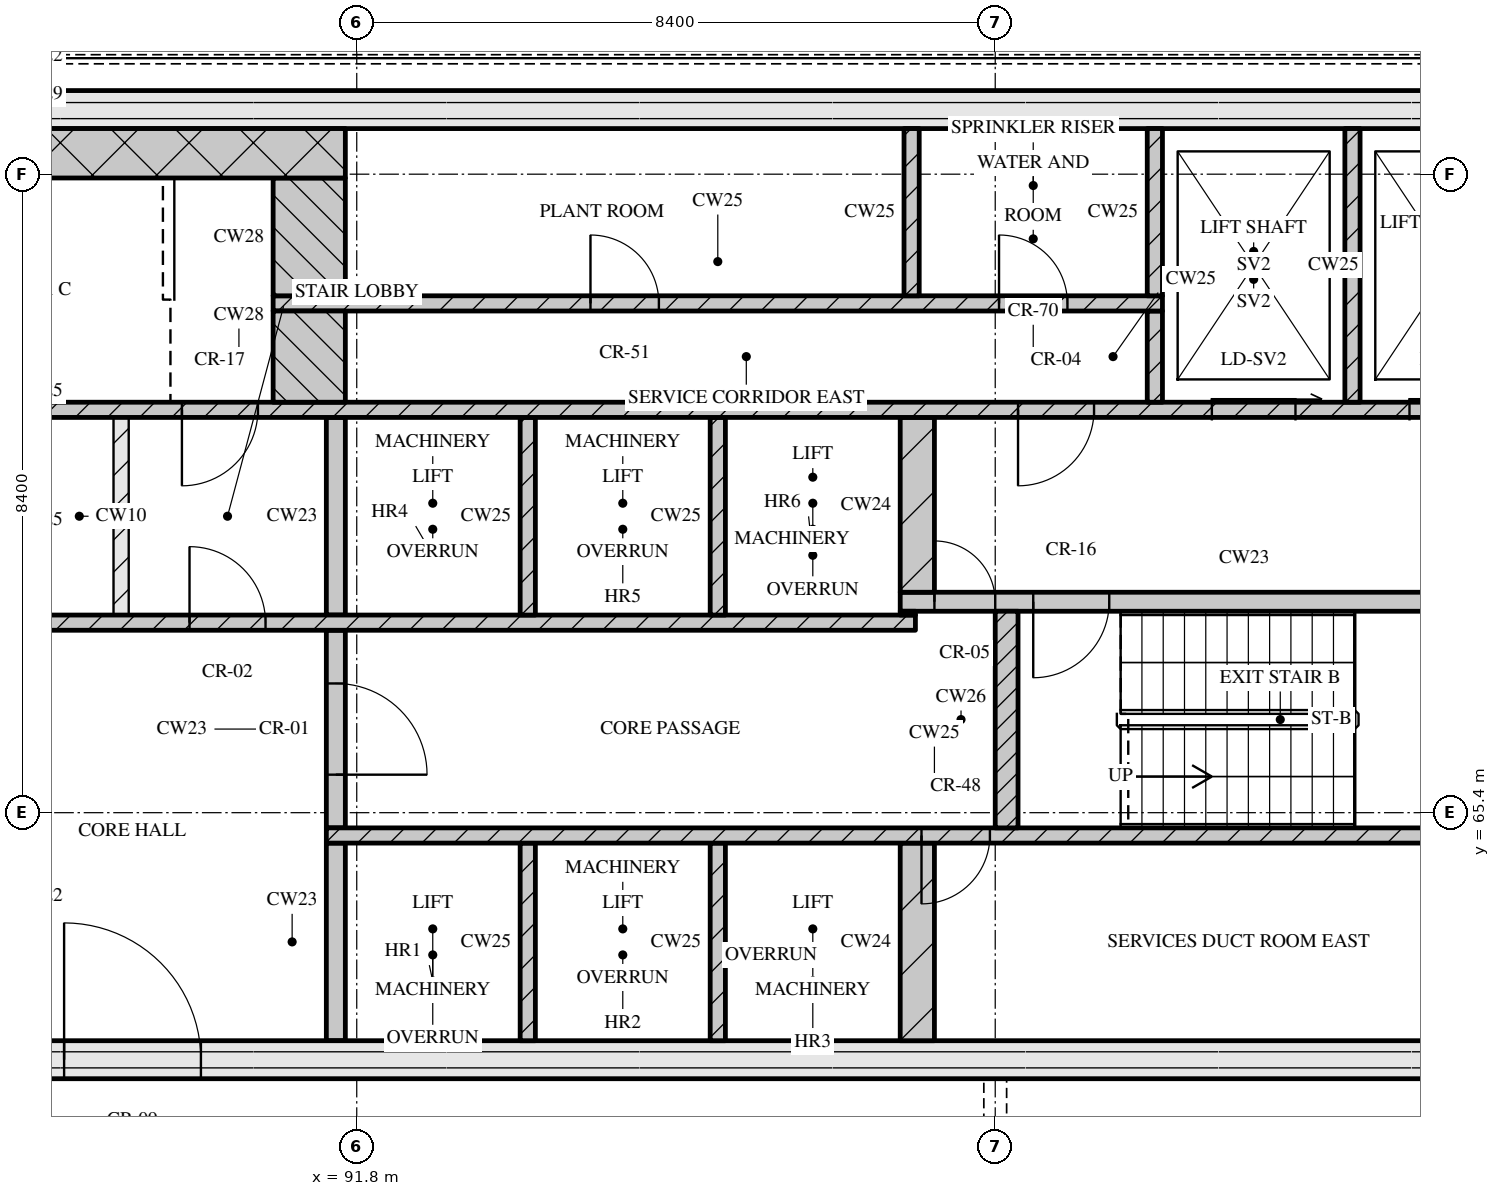
"""IFC4 building model, lengths in metres.
Left out: names, types, materials, properties, quantities, classifications, styles, units other than length and angle.
Written with IfcOpenShell. Run it as: python <this file> out.ifc"""

import sys

from ifc_helpers import new_model, si_unit, direction, frame, frame_2d, origin, place, context, subcontext, project, spatial, rectangle, extrude, element, fill, save


model = new_model("IFC4")
c1 = context("Model", 3, precision=1e-05, world=origin(), true_north=direction((0.0, 1.0)))
c2 = subcontext(c1, "Body", "Model", "MODEL_VIEW")
j1 = project(units=[si_unit("LENGTHUNIT", "METRE"), si_unit("PLANEANGLEUNIT", "RADIAN")], contexts=[c1])
p1 = place(None, origin())
s1 = spatial("IfcSite", under=j1, at=p1, CompositionType="ELEMENT")
p2 = place(p1, origin())
s2 = spatial("IfcBuilding", under=s1, at=p2, CompositionType="ELEMENT")
p3 = place(p2, frame((0.0, 0.0, 310.35)))
s3 = spatial("IfcBuildingStorey", under=s2, at=p3, CompositionType="ELEMENT", Elevation=310.35)
p4 = place(p3, frame((67.3, 62.15, 0.0), z_axis=(0.0, 0.0, 1.0), x_axis=(1.0, 0.0, 0.0)))
e1 = element("IfcWall", 1, at=p4, inside=s3, PredefinedType="SOLIDWALL", context=c2, shape_type="SweptSolid", body=[
    extrude(rectangle(XDim=40.6, YDim=0.5, at=frame_2d((20.3, 0.0))), origin(), (0.0, 0.0, 1.0), 4.2),
])
p5 = place(p4, frame((20.65, 0.0, 0.0)))
e2 = element("IfcOpeningElement", 2, at=p5, cuts=e1, PredefinedType="OPENING", context=c2, shape_type="SweptSolid", body=[
    extrude(rectangle(XDim=1.8, YDim=2.1, at=frame_2d((0.9, 1.05))), frame((0.0, 0.26, 0.0), z_axis=(0.0, -1.0, 0.0), x_axis=(1.0, 0.0, 0.0)), (0.0, 0.0, 1.0), 0.52),
])
p6 = place(p3, frame((67.3, 74.65, 0.0), z_axis=(0.0, 0.0, 1.0), x_axis=(1.0, 0.0, 0.0)))
e3 = element("IfcWall", 3, at=p6, inside=s3, PredefinedType="SOLIDWALL", context=c2, shape_type="SweptSolid", body=[
    extrude(rectangle(XDim=40.6, YDim=0.5, at=frame_2d((20.3, 0.0))), origin(), (0.0, 0.0, 1.0), 4.2),
])
p7 = place(p3, frame((91.525, 62.4, 0.0), z_axis=(0.0, 0.0, 1.0), x_axis=(0.0, 1.0, 0.0)))
e4 = element("IfcWall", 4, at=p7, inside=s3, PredefinedType="SOLIDWALL", context=c2, shape_type="SweptSolid", body=[
    extrude(rectangle(XDim=2.6, YDim=0.25, at=frame_2d((1.3, 0.0))), origin(), (0.0, 0.0, 1.0), 4.2),
])
for number, where, z_axis, x_axis in (
    (5, (94.05, 62.4, 0.0), (0.0, 0.0, 1.0), (0.0, 1.0, 0.0)),
    (6, (96.55, 62.4, 0.0), (0.0, 0.0, 1.0), (0.0, 1.0, 0.0)),
):
    element("IfcWall", number, at=place(p3, frame(where, z_axis=z_axis, x_axis=x_axis)), inside=s3, PredefinedType="SOLIDWALL", context=c2, shape_type="SweptSolid", body=[
        extrude(rectangle(XDim=2.6, YDim=0.2, at=frame_2d((1.3, 0.0))), origin(), (0.0, 0.0, 1.0), 4.2),
    ])
p8 = place(p3, frame((99.175, 62.4, 0.0), z_axis=(0.0, 0.0, 1.0), x_axis=(0.0, 1.0, 0.0)))
e7 = element("IfcWall", 7, at=p8, inside=s3, PredefinedType="SOLIDWALL", context=c2, shape_type="SweptSolid", body=[
    extrude(rectangle(XDim=2.6, YDim=0.45, at=frame_2d((1.3, 0.0))), origin(), (0.0, 0.0, 1.0), 4.2),
])
p9 = place(p3, frame((91.4, 65.1, 0.0), z_axis=(0.0, 0.0, 1.0), x_axis=(1.0, 0.0, 0.0)))
e8 = element("IfcWall", 8, at=p9, inside=s3, PredefinedType="SOLIDWALL", context=c2, shape_type="SweptSolid", body=[
    extrude(rectangle(XDim=16.0, YDim=0.2, at=frame_2d((8.0, 0.0))), origin(), (0.0, 0.0, 1.0), 4.2),
])
p10 = place(p9, frame((7.83, 0.0, 0.0)))
e9 = element("IfcOpeningElement", 9, at=p10, cuts=e8, PredefinedType="OPENING", context=c2, shape_type="SweptSolid", body=[
    extrude(rectangle(XDim=0.9, YDim=2.1, at=frame_2d((0.45, 1.05))), frame((0.0, 0.11, 0.0), z_axis=(0.0, -1.0, 0.0), x_axis=(1.0, 0.0, 0.0)), (0.0, 0.0, 1.0), 0.22),
])
p11 = place(p3, frame((91.525, 65.2, 0.0), z_axis=(0.0, 0.0, 1.0), x_axis=(0.0, 1.0, 0.0)))
e10 = element("IfcWall", 10, at=p11, inside=s3, PredefinedType="SOLIDWALL", context=c2, shape_type="SweptSolid", body=[
    extrude(rectangle(XDim=2.6, YDim=0.25, at=frame_2d((1.3, 0.0))), origin(), (0.0, 0.0, 1.0), 4.2),
])
p12 = place(p11, frame((0.7, 0.0, 0.0)))
e11 = element("IfcOpeningElement", 11, at=p12, cuts=e10, PredefinedType="OPENING", context=c2, shape_type="SweptSolid", body=[
    extrude(rectangle(XDim=1.2, YDim=2.1, at=frame_2d((0.6, 1.05))), frame((0.0, 0.135, 0.0), z_axis=(0.0, -1.0, 0.0), x_axis=(1.0, 0.0, 0.0)), (0.0, 0.0, 1.0), 0.27),
])
p13 = place(p3, frame((100.35, 65.2, 0.0), z_axis=(0.0, 0.0, 1.0), x_axis=(0.0, 1.0, 0.0)))
e12 = element("IfcWall", 12, at=p13, inside=s3, PredefinedType="SOLIDWALL", context=c2, shape_type="SweptSolid", body=[
    extrude(rectangle(XDim=2.85, YDim=0.3, at=frame_2d((1.425, 0.0))), origin(), (0.0, 0.0, 1.0), 4.2),
])
p14 = place(p3, frame((76.05, 67.9, 0.0), z_axis=(0.0, 0.0, 1.0), x_axis=(1.0, 0.0, 0.0)))
e13 = element("IfcWall", 13, at=p14, inside=s3, PredefinedType="SOLIDWALL", context=c2, shape_type="SweptSolid", body=[
    extrude(rectangle(XDim=23.1, YDim=0.2, at=frame_2d((11.55, 0.0))), origin(), (0.0, 0.0, 1.0), 4.2),
])
p15 = place(p14, frame((1.95, 0.0, 0.0)))
e14 = element("IfcOpeningElement", 14, at=p15, cuts=e13, PredefinedType="OPENING", context=c2, shape_type="SweptSolid", body=[
    extrude(rectangle(XDim=0.9, YDim=2.1, at=frame_2d((0.45, 1.05))), frame((0.0, 0.11, 0.0), z_axis=(0.0, -1.0, 0.0), x_axis=(1.0, 0.0, 0.0)), (0.0, 0.0, 1.0), 0.22),
])
p16 = place(p14, frame((5.66, 0.0, 0.0)))
e15 = element("IfcOpeningElement", 15, at=p16, cuts=e13, PredefinedType="OPENING", context=c2, shape_type="SweptSolid", body=[
    extrude(rectangle(XDim=0.9, YDim=2.1, at=frame_2d((0.45, 1.05))), frame((0.0, 0.11, 0.0), z_axis=(0.0, -1.0, 0.0), x_axis=(1.0, 0.0, 0.0)), (0.0, 0.0, 1.0), 0.22),
])
p17 = place(p14, frame((9.7, 0.0, 0.0)))
e16 = element("IfcOpeningElement", 16, at=p17, cuts=e13, PredefinedType="OPENING", context=c2, shape_type="SweptSolid", body=[
    extrude(rectangle(XDim=0.9, YDim=2.1, at=frame_2d((0.45, 1.05))), frame((0.0, 0.11, 0.0), z_axis=(0.0, -1.0, 0.0), x_axis=(1.0, 0.0, 0.0)), (0.0, 0.0, 1.0), 0.22),
])
p18 = place(p14, frame((13.55, 0.0, 0.0)))
e17 = element("IfcOpeningElement", 17, at=p18, cuts=e13, PredefinedType="OPENING", context=c2, shape_type="SweptSolid", body=[
    extrude(rectangle(XDim=1.0, YDim=2.1, at=frame_2d((0.5, 1.05))), frame((0.0, 0.11, 0.0), z_axis=(0.0, -1.0, 0.0), x_axis=(1.0, 0.0, 0.0)), (0.0, 0.0, 1.0), 0.22),
])
p19 = place(p3, frame((88.7, 68.0, 0.0), z_axis=(0.0, 0.0, 1.0), x_axis=(0.0, 1.0, 0.0)))
e18 = element("IfcWall", 18, at=p19, inside=s3, PredefinedType="PARTITIONING", context=c2, shape_type="SweptSolid", body=[
    extrude(rectangle(XDim=2.6, YDim=0.2, at=frame_2d((1.3, 0.0))), origin(), (0.0, 0.0, 1.0), 4.2),
])
p20 = place(p3, frame((91.525, 68.0, 0.0), z_axis=(0.0, 0.0, 1.0), x_axis=(0.0, 1.0, 0.0)))
e19 = element("IfcWall", 19, at=p20, inside=s3, PredefinedType="SOLIDWALL", context=c2, shape_type="SweptSolid", body=[
    extrude(rectangle(XDim=2.6, YDim=0.25, at=frame_2d((1.3, 0.0))), origin(), (0.0, 0.0, 1.0), 4.2),
])
for number, where, z_axis, x_axis in (
    (20, (94.05, 68.0, 0.0), (0.0, 0.0, 1.0), (0.0, 1.0, 0.0)),
    (21, (96.55, 68.0, 0.0), (0.0, 0.0, 1.0), (0.0, 1.0, 0.0)),
):
    element("IfcWall", number, at=place(p3, frame(where, z_axis=z_axis, x_axis=x_axis)), inside=s3, PredefinedType="SOLIDWALL", context=c2, shape_type="SweptSolid", body=[
        extrude(rectangle(XDim=2.6, YDim=0.2, at=frame_2d((1.3, 0.0))), origin(), (0.0, 0.0, 1.0), 4.2),
    ])
p21 = place(p3, frame((98.95, 68.025, 0.0), z_axis=(0.0, 0.0, 1.0), x_axis=(1.0, 0.0, 0.0)))
e22 = element("IfcWall", 22, at=p21, inside=s3, PredefinedType="SOLIDWALL", context=c2, shape_type="SweptSolid", body=[
    extrude(rectangle(XDim=0.2, YDim=0.05, at=frame_2d((0.1, 0.0))), origin(), (0.0, 0.0, 1.0), 4.2),
])
p22 = place(p3, frame((98.95, 68.175, 0.0), z_axis=(0.0, 0.0, 1.0), x_axis=(1.0, 0.0, 0.0)))
e23 = element("IfcWall", 23, at=p22, inside=s3, PredefinedType="SOLIDWALL", context=c2, shape_type="SweptSolid", body=[
    extrude(rectangle(XDim=8.45, YDim=0.25, at=frame_2d((4.225, 0.0))), origin(), (0.0, 0.0, 1.0), 4.2),
])
p23 = place(p22, frame((0.45, 0.0, 0.0)))
e24 = element("IfcOpeningElement", 24, at=p23, cuts=e23, PredefinedType="OPENING", context=c2, shape_type="SweptSolid", body=[
    extrude(rectangle(XDim=0.8, YDim=2.1, at=frame_2d((0.4, 1.05))), frame((0.0, 0.135, 0.0), z_axis=(0.0, -1.0, 0.0), x_axis=(1.0, 0.0, 0.0)), (0.0, 0.0, 1.0), 0.27),
])
p24 = place(p22, frame((1.75, 0.0, 0.0)))
e25 = element("IfcOpeningElement", 25, at=p24, cuts=e23, PredefinedType="OPENING", context=c2, shape_type="SweptSolid", body=[
    extrude(rectangle(XDim=1.0, YDim=2.1, at=frame_2d((0.5, 1.05))), frame((0.0, 0.135, 0.0), z_axis=(0.0, -1.0, 0.0), x_axis=(1.0, 0.0, 0.0)), (0.0, 0.0, 1.0), 0.27),
])
p25 = place(p3, frame((99.175, 68.3, 0.0), z_axis=(0.0, 0.0, 1.0), x_axis=(0.0, 1.0, 0.0)))
e26 = element("IfcWall", 26, at=p25, inside=s3, PredefinedType="SOLIDWALL", context=c2, shape_type="SweptSolid", body=[
    extrude(rectangle(XDim=2.3, YDim=0.45, at=frame_2d((1.15, 0.0))), origin(), (0.0, 0.0, 1.0), 4.2),
])
p26 = place(p3, frame((67.8, 70.7, 0.0), z_axis=(0.0, 0.0, 1.0), x_axis=(1.0, 0.0, 0.0)))
e27 = element("IfcWall", 27, at=p26, inside=s3, PredefinedType="SOLIDWALL", context=c2, shape_type="SweptSolid", body=[
    extrude(rectangle(XDim=39.6, YDim=0.2, at=frame_2d((19.8, 0.0))), origin(), (0.0, 0.0, 1.0), 4.2),
])
p27 = place(p26, frame((0.65, 0.0, 0.0)))
e28 = element("IfcOpeningElement", 28, at=p27, cuts=e27, PredefinedType="OPENING", context=c2, shape_type="SweptSolid", body=[
    extrude(rectangle(XDim=1.1, YDim=2.1, at=frame_2d((0.55, 1.05))), frame((0.0, 0.11, 0.0), z_axis=(0.0, -1.0, 0.0), x_axis=(1.0, 0.0, 0.0)), (0.0, 0.0, 1.0), 0.22),
])
p28 = place(p26, frame((3.25, 0.0, 0.0)))
e29 = element("IfcOpeningElement", 29, at=p28, cuts=e27, PredefinedType="OPENING", context=c2, shape_type="SweptSolid", body=[
    extrude(rectangle(XDim=1.1, YDim=2.1, at=frame_2d((0.55, 1.05))), frame((0.0, 0.11, 0.0), z_axis=(0.0, -1.0, 0.0), x_axis=(1.0, 0.0, 0.0)), (0.0, 0.0, 1.0), 0.22),
])
p29 = place(p26, frame((5.9, 0.0, 0.0)))
e30 = element("IfcOpeningElement", 30, at=p29, cuts=e27, PredefinedType="OPENING", context=c2, shape_type="SweptSolid", body=[
    extrude(rectangle(XDim=1.0, YDim=2.1, at=frame_2d((0.5, 1.05))), frame((0.0, 0.11, 0.0), z_axis=(0.0, -1.0, 0.0), x_axis=(1.0, 0.0, 0.0)), (0.0, 0.0, 1.0), 0.22),
])
p30 = place(p26, frame((21.7, 0.0, 0.0)))
e31 = element("IfcOpeningElement", 31, at=p30, cuts=e27, PredefinedType="OPENING", context=c2, shape_type="SweptSolid", body=[
    extrude(rectangle(XDim=1.0, YDim=2.1, at=frame_2d((0.5, 1.05))), frame((0.0, 0.11, 0.0), z_axis=(0.0, -1.0, 0.0), x_axis=(1.0, 0.0, 0.0)), (0.0, 0.0, 1.0), 0.22),
])
p31 = place(p26, frame((32.7, 0.0, 0.0)))
e32 = element("IfcOpeningElement", 32, at=p31, cuts=e27, PredefinedType="OPENING", context=c2, shape_type="SweptSolid", body=[
    extrude(rectangle(XDim=1.0, YDim=2.1, at=frame_2d((0.5, 1.05))), frame((0.0, 0.11, 0.0), z_axis=(0.0, -1.0, 0.0), x_axis=(1.0, 0.0, 0.0)), (0.0, 0.0, 1.0), 0.22),
])
p32 = place(p26, frame((35.25, 0.0, 0.0)))
e33 = element("IfcOpeningElement", 33, at=p32, cuts=e27, PredefinedType="OPENING", context=c2, shape_type="SweptSolid", body=[
    extrude(rectangle(XDim=1.1, YDim=2.1, at=frame_2d((0.55, 1.05))), frame((0.0, 0.11, 0.0), z_axis=(0.0, -1.0, 0.0), x_axis=(1.0, 0.0, 0.0)), (0.0, 0.0, 1.0), 0.22),
])
p33 = place(p26, frame((37.85, 0.0, 0.0)))
e34 = element("IfcOpeningElement", 34, at=p33, cuts=e27, PredefinedType="OPENING", context=c2, shape_type="SweptSolid", body=[
    extrude(rectangle(XDim=1.1, YDim=2.1, at=frame_2d((0.55, 1.05))), frame((0.0, 0.11, 0.0), z_axis=(0.0, -1.0, 0.0), x_axis=(1.0, 0.0, 0.0)), (0.0, 0.0, 1.0), 0.22),
])
p34 = place(p3, frame((91.175, 70.8, 0.0), z_axis=(0.0, 0.0, 1.0), x_axis=(0.0, 1.0, 0.0)))
e35 = element("IfcWall", 35, at=p34, inside=s3, PredefinedType="SOLIDWALL", context=c2, shape_type="SweptSolid", body=[
    extrude(rectangle(XDim=1.2, YDim=0.95, at=frame_2d((0.6, 0.0))), origin(), (0.0, 0.0, 1.0), 4.2),
])
p35 = place(p3, frame((102.3, 70.8, 0.0), z_axis=(0.0, 0.0, 1.0), x_axis=(0.0, 1.0, 0.0)))
e36 = element("IfcWall", 36, at=p35, inside=s3, PredefinedType="SOLIDWALL", context=c2, shape_type="SweptSolid", body=[
    extrude(rectangle(XDim=1.2, YDim=0.2, at=frame_2d((0.6, 0.0))), origin(), (0.0, 0.0, 1.0), 4.2),
])
p36 = place(p3, frame((104.9, 70.8, 0.0), z_axis=(0.0, 0.0, 1.0), x_axis=(0.0, 1.0, 0.0)))
e37 = element("IfcWall", 37, at=p36, inside=s3, PredefinedType="SOLIDWALL", context=c2, shape_type="SweptSolid", body=[
    extrude(rectangle(XDim=3.6, YDim=0.2, at=frame_2d((1.8, 0.0))), origin(), (0.0, 0.0, 1.0), 4.2),
])
p37 = place(p3, frame((90.7, 72.1, 0.0), z_axis=(0.0, 0.0, 1.0), x_axis=(1.0, 0.0, 0.0)))
e38 = element("IfcWall", 38, at=p37, inside=s3, PredefinedType="SOLIDWALL", context=c2, shape_type="SweptSolid", body=[
    extrude(rectangle(XDim=11.7, YDim=0.2, at=frame_2d((5.85, 0.0))), origin(), (0.0, 0.0, 1.0), 4.2),
])
p38 = place(p37, frame((4.175, 0.0, 0.0)))
e39 = element("IfcOpeningElement", 39, at=p38, cuts=e38, PredefinedType="OPENING", context=c2, shape_type="SweptSolid", body=[
    extrude(rectangle(XDim=0.9, YDim=2.1, at=frame_2d((0.45, 1.05))), frame((0.0, 0.11, 0.0), z_axis=(0.0, -1.0, 0.0), x_axis=(1.0, 0.0, 0.0)), (0.0, 0.0, 1.0), 0.22),
])
p39 = place(p37, frame((9.55, 0.0, 0.0)))
e40 = element("IfcOpeningElement", 40, at=p39, cuts=e38, PredefinedType="OPENING", context=c2, shape_type="SweptSolid", body=[
    extrude(rectangle(XDim=0.9, YDim=2.1, at=frame_2d((0.45, 1.05))), frame((0.0, 0.11, 0.0), z_axis=(0.0, -1.0, 0.0), x_axis=(1.0, 0.0, 0.0)), (0.0, 0.0, 1.0), 0.22),
])
p40 = place(p3, frame((91.175, 72.2, 0.0), z_axis=(0.0, 0.0, 1.0), x_axis=(0.0, 1.0, 0.0)))
e41 = element("IfcWall", 41, at=p40, inside=s3, PredefinedType="SOLIDWALL", context=c2, shape_type="SweptSolid", body=[
    extrude(rectangle(XDim=1.55, YDim=0.95, at=frame_2d((0.775, 0.0))), origin(), (0.0, 0.0, 1.0), 4.2),
])
for number, where, z_axis, x_axis in (
    (42, (99.1, 72.2, 0.0), (0.0, 0.0, 1.0), (0.0, 1.0, 0.0)),
    (43, (102.3, 72.2, 0.0), (0.0, 0.0, 1.0), (0.0, 1.0, 0.0)),
):
    element("IfcWall", number, at=place(p3, frame(where, z_axis=z_axis, x_axis=x_axis)), inside=s3, PredefinedType="SOLIDWALL", context=c2, shape_type="SweptSolid", body=[
        extrude(rectangle(XDim=2.2, YDim=0.2, at=frame_2d((1.1, 0.0))), origin(), (0.0, 0.0, 1.0), 4.2),
    ])
p41 = place(p3, frame((83.55, 74.075, 0.0), z_axis=(0.0, 0.0, 1.0), x_axis=(1.0, 0.0, 0.0)))
e44 = element("IfcWall", 44, at=p41, inside=s3, PredefinedType="SOLIDWALL", context=c2, shape_type="SweptSolid", body=[
    extrude(rectangle(XDim=8.1, YDim=0.65, at=frame_2d((4.05, 0.0))), origin(), (0.0, 0.0, 1.0), 4.2),
])
p42 = place(p5, origin())
e45 = element("IfcDoor", 45, at=p42, inside=s3, OperationType="DOUBLE_DOOR_SINGLE_SWING", PredefinedType="DOOR", context=c2, shape_type="SweptSolid", body=[
    extrude(rectangle(XDim=1.8, YDim=2.1, at=frame_2d((0.9, 1.05))), frame((0.0, 0.025, 0.0), z_axis=(0.0, -1.0, 0.0), x_axis=(1.0, 0.0, 0.0)), (0.0, 0.0, 1.0), 0.05),
])
fill(e2, e45)
p43 = place(p10, origin())
e46 = element("IfcDoor", 46, at=p43, inside=s3, OperationType="SINGLE_SWING_RIGHT", PredefinedType="DOOR", context=c2, shape_type="SweptSolid", body=[
    extrude(rectangle(XDim=0.9, YDim=2.1, at=frame_2d((0.45, 1.05))), frame((0.0, 0.025, 0.0), z_axis=(0.0, -1.0, 0.0), x_axis=(1.0, 0.0, 0.0)), (0.0, 0.0, 1.0), 0.05),
])
fill(e9, e46)
p44 = place(p12, origin())
e47 = element("IfcDoor", 47, at=p44, inside=s3, OperationType="SINGLE_SWING_RIGHT", PredefinedType="DOOR", context=c2, shape_type="SweptSolid", body=[
    extrude(rectangle(XDim=1.2, YDim=2.1, at=frame_2d((0.6, 1.05))), frame((0.0, 0.025, 0.0), z_axis=(0.0, -1.0, 0.0), x_axis=(1.0, 0.0, 0.0)), (0.0, 0.0, 1.0), 0.05),
])
fill(e11, e47)
p45 = place(p18, origin())
e48 = element("IfcDoor", 48, at=p45, inside=s3, OperationType="SINGLE_SWING_LEFT", PredefinedType="DOOR", context=c2, shape_type="SweptSolid", body=[
    extrude(rectangle(XDim=1.0, YDim=2.1, at=frame_2d((0.5, 1.05))), frame((0.0, 0.025, 0.0), z_axis=(0.0, -1.0, 0.0), x_axis=(1.0, 0.0, 0.0)), (0.0, 0.0, 1.0), 0.05),
])
fill(e17, e48)
p46 = place(p23, origin())
e49 = element("IfcDoor", 49, at=p46, inside=s3, OperationType="SINGLE_SWING_LEFT", PredefinedType="DOOR", context=c2, shape_type="SweptSolid", body=[
    extrude(rectangle(XDim=0.8, YDim=2.1, at=frame_2d((0.4, 1.05))), frame((0.0, 0.025, 0.0), z_axis=(0.0, -1.0, 0.0), x_axis=(1.0, 0.0, 0.0)), (0.0, 0.0, 1.0), 0.05),
])
fill(e24, e49)
p47 = place(p24, origin())
e50 = element("IfcDoor", 50, at=p47, inside=s3, OperationType="SINGLE_SWING_RIGHT", PredefinedType="DOOR", context=c2, shape_type="SweptSolid", body=[
    extrude(rectangle(XDim=1.0, YDim=2.1, at=frame_2d((0.5, 1.05))), frame((0.0, 0.025, 0.0), z_axis=(0.0, -1.0, 0.0), x_axis=(1.0, 0.0, 0.0)), (0.0, 0.0, 1.0), 0.05),
])
fill(e25, e50)
p48 = place(p30, origin())
e51 = element("IfcDoor", 51, at=p48, inside=s3, OperationType="SINGLE_SWING_RIGHT", PredefinedType="DOOR", context=c2, shape_type="SweptSolid", body=[
    extrude(rectangle(XDim=1.0, YDim=2.1, at=frame_2d((0.5, 1.05))), frame((0.0, 0.025, 0.0), z_axis=(0.0, -1.0, 0.0), x_axis=(1.0, 0.0, 0.0)), (0.0, 0.0, 1.0), 0.05),
])
fill(e31, e51)
p49 = place(p31, origin())
e52 = element("IfcDoor", 52, at=p49, inside=s3, OperationType="SINGLE_SWING_RIGHT", PredefinedType="DOOR", context=c2, shape_type="SweptSolid", body=[
    extrude(rectangle(XDim=1.0, YDim=2.1, at=frame_2d((0.5, 1.05))), frame((0.0, 0.025, 0.0), z_axis=(0.0, -1.0, 0.0), x_axis=(1.0, 0.0, 0.0)), (0.0, 0.0, 1.0), 0.05),
])
fill(e32, e52)
p50 = place(p32, origin())
e53 = element("IfcDoor", 53, at=p50, inside=s3, OperationType="SLIDING_TO_RIGHT", PredefinedType="DOOR", context=c2, shape_type="SweptSolid", body=[
    extrude(rectangle(XDim=1.1, YDim=2.1, at=frame_2d((0.55, 1.05))), frame((0.0, 0.025, 0.0), z_axis=(0.0, -1.0, 0.0), x_axis=(1.0, 0.0, 0.0)), (0.0, 0.0, 1.0), 0.05),
])
fill(e33, e53)
p51 = place(p33, origin())
e54 = element("IfcDoor", 54, at=p51, inside=s3, OperationType="SLIDING_TO_RIGHT", PredefinedType="DOOR", context=c2, shape_type="SweptSolid", body=[
    extrude(rectangle(XDim=1.1, YDim=2.1, at=frame_2d((0.55, 1.05))), frame((0.0, 0.025, 0.0), z_axis=(0.0, -1.0, 0.0), x_axis=(1.0, 0.0, 0.0)), (0.0, 0.0, 1.0), 0.05),
])
fill(e34, e54)
p52 = place(p38, origin())
e55 = element("IfcDoor", 55, at=p52, inside=s3, OperationType="SINGLE_SWING_LEFT", PredefinedType="DOOR", context=c2, shape_type="SweptSolid", body=[
    extrude(rectangle(XDim=0.9, YDim=2.1, at=frame_2d((0.45, 1.05))), frame((0.0, 0.025, 0.0), z_axis=(0.0, -1.0, 0.0), x_axis=(1.0, 0.0, 0.0)), (0.0, 0.0, 1.0), 0.05),
])
fill(e39, e55)
p53 = place(p39, origin())
e56 = element("IfcDoor", 56, at=p53, inside=s3, OperationType="SINGLE_SWING_LEFT", PredefinedType="DOOR", context=c2, shape_type="SweptSolid", body=[
    extrude(rectangle(XDim=0.9, YDim=2.1, at=frame_2d((0.45, 1.05))), frame((0.0, 0.025, 0.0), z_axis=(0.0, -1.0, 0.0), x_axis=(1.0, 0.0, 0.0)), (0.0, 0.0, 1.0), 0.05),
])
fill(e40, e56)
save(model, sys.argv[1])
